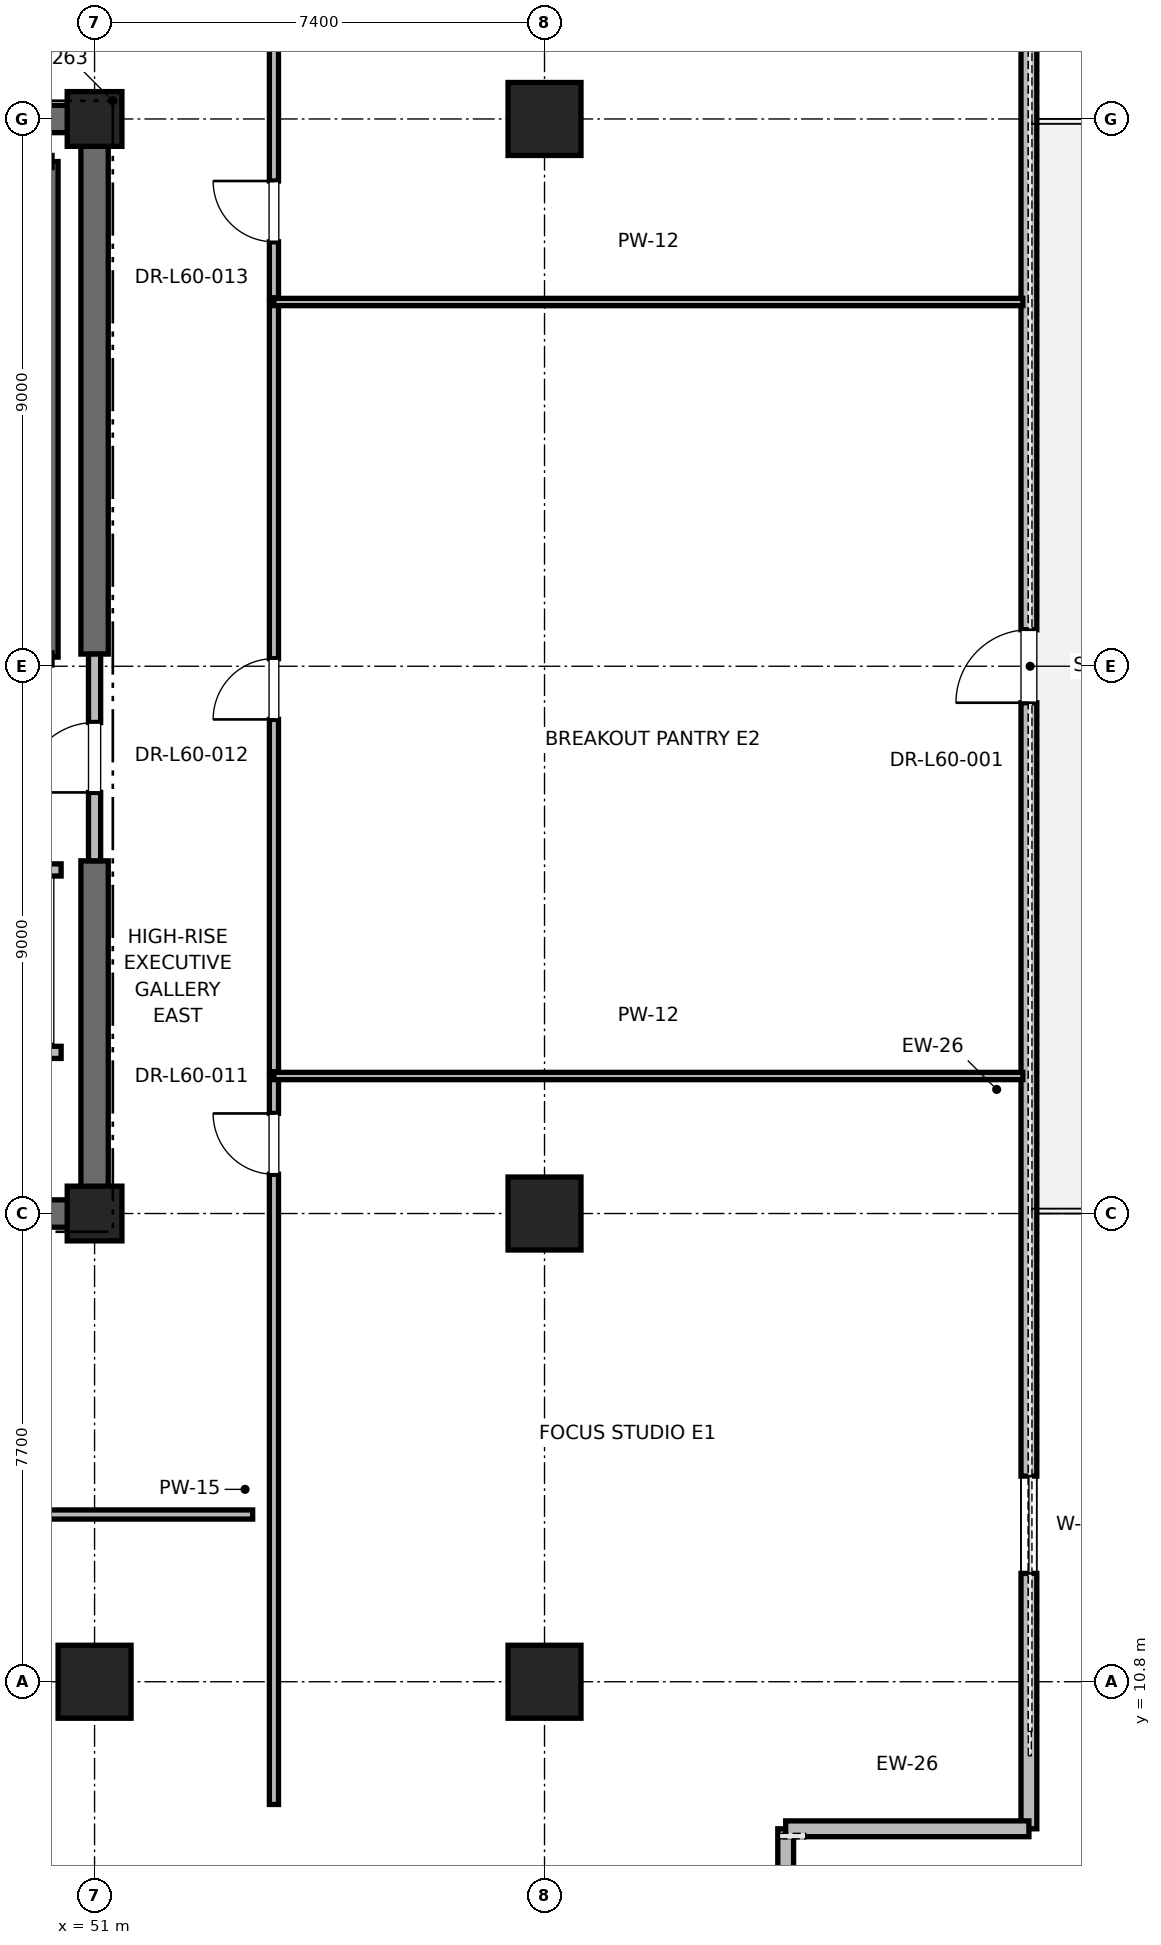
"""IFC4 building model, lengths in metres.
Left out: names, types, materials, properties, quantities, classifications, styles, units other than length and angle.
Written with IfcOpenShell. Run it as: python <this file> out.ifc"""

import sys

from ifc_helpers import new_model, si_unit, direction, frame, frame_2d, origin, origin_2d, place, context, subcontext, project, spatial, rectangle, extrude, element, fill, save


model = new_model("IFC4")
c1 = context("Model", 3, precision=1e-05, world=origin(), true_north=direction((0.0, 1.0)))
c2 = subcontext(c1, "Body", "Model", "MODEL_VIEW")
j1 = project(units=[si_unit("LENGTHUNIT", "METRE"), si_unit("PLANEANGLEUNIT", "RADIAN")], contexts=[c1])
p1 = place(None, origin())
s1 = spatial("IfcSite", under=j1, at=p1, CompositionType="ELEMENT")
p2 = place(p1, origin())
s2 = spatial("IfcBuilding", under=s1, at=p2, CompositionType="ELEMENT")
p3 = place(p2, frame((0.0, 0.0, 259.2)))
s3 = spatial("IfcBuildingStorey", under=s2, at=p3, CompositionType="ELEMENT", Elevation=259.2)
for number, where, z_axis, x_axis in (
    (1, (51.0, 10.8, 0.0), (0.0, 0.0, 1.0), (1.0, 0.0, 0.0)),
    (2, (58.4, 18.5, 0.0), (0.0, 0.0, 1.0), (1.0, 0.0, 0.0)),
    (3, (58.4, 36.5, 0.0), (0.0, 0.0, 1.0), (1.0, 0.0, 0.0)),
    (4, (58.4, 10.8, 0.0), (0.0, 0.0, 1.0), (1.0, 0.0, 0.0)),
):
    element("IfcColumn", number, at=place(p3, frame(where, z_axis=z_axis, x_axis=x_axis)), inside=s3, PredefinedType="COLUMN", context=c2, shape_type="SweptSolid", body=[
        extrude(rectangle(XDim=1.2, YDim=1.2, at=origin_2d()), origin(), (0.0, 0.0, 1.0), 4.0),
    ])
for number, where, z_axis, x_axis in (
    (5, (51.0, 18.5, 0.0), (0.0, 0.0, 1.0), (1.0, 0.0, 0.0)),
    (6, (51.0, 36.5, 0.0), (0.0, 0.0, 1.0), (1.0, 0.0, 0.0)),
):
    element("IfcColumn", number, at=place(p3, frame(where, z_axis=z_axis, x_axis=x_axis)), inside=s3, PredefinedType="PILASTER", context=c2, shape_type="SweptSolid", body=[
        extrude(rectangle(XDim=0.9, YDim=0.9, at=origin_2d()), origin(), (0.0, 0.0, 1.0), 4.0),
    ])
p4 = place(p3, frame((41.8, 18.5, 0.0), z_axis=(0.0, 0.0, 1.0), x_axis=(1.0, 0.0, 0.0)))
e7 = element("IfcWall", 7, at=p4, inside=s3, PredefinedType="SHEAR", context=c2, shape_type="SweptSolid", body=[
    extrude(rectangle(XDim=9.2, YDim=0.45, at=frame_2d((4.6, 0.0))), origin(), (0.0, 0.0, 1.0), 3.785),
])
for number, where, z_axis, x_axis in (
    (8, (45.2, 36.5, 0.0), (0.0, 0.0, 1.0), (1.0, 0.0, 0.0)),
    (9, (51.0, 18.5, 0.0), (0.0, 0.0, 1.0), (0.0, 1.0, 0.0)),
):
    element("IfcWall", number, at=place(p3, frame(where, z_axis=z_axis, x_axis=x_axis)), inside=s3, PredefinedType="SHEAR", context=c2, shape_type="SweptSolid", body=[
        extrude(rectangle(XDim=5.8, YDim=0.45, at=frame_2d((2.9, 0.0))), origin(), (0.0, 0.0, 1.0), 3.785),
    ])
p5 = place(p3, frame((51.0, 27.7, 0.0), z_axis=(0.0, 0.0, 1.0), x_axis=(0.0, 1.0, 0.0)))
e10 = element("IfcWall", 10, at=p5, inside=s3, PredefinedType="SHEAR", context=c2, shape_type="SweptSolid", body=[
    extrude(rectangle(XDim=8.8, YDim=0.45, at=frame_2d((4.4, 0.0))), origin(), (0.0, 0.0, 1.0), 3.785),
])
p6 = place(p3, frame((66.366, 8.382, 0.0), z_axis=(0.0, 0.0, 1.0), x_axis=(0.0, 1.0, 0.0)))
e11 = element("IfcWall", 11, at=p6, inside=s3, PredefinedType="PARAPET", context=c2, shape_type="SweptSolid", body=[
    extrude(rectangle(XDim=38.236, YDim=0.26, at=frame_2d((19.118, 0.0))), origin(), (0.0, 0.0, 1.0), 3.123),
])
p7 = place(p6, frame((4.2, 0.0, 0.85)))
e12 = element("IfcOpeningElement", 12, at=p7, cuts=e11, PredefinedType="OPENING", context=c2, shape_type="SweptSolid", body=[
    extrude(rectangle(XDim=1.6, YDim=2.1, at=frame_2d((0.8, 1.05))), frame((0.0, 0.13, 0.0), z_axis=(0.0, -1.0, 0.0), x_axis=(1.0, 0.0, 0.0)), (0.0, 0.0, 1.0), 0.26),
])
p8 = place(p6, frame((18.518, 0.0, 0.0)))
e13 = element("IfcOpeningElement", 13, at=p8, cuts=e11, PredefinedType="OPENING", context=c2, shape_type="SweptSolid", body=[
    extrude(rectangle(XDim=1.2, YDim=2.2, at=frame_2d((0.6, 1.1))), frame((0.0, 0.13, 0.0), z_axis=(0.0, -1.0, 0.0), x_axis=(1.0, 0.0, 0.0)), (0.0, 0.0, 1.0), 0.26),
])
p9 = place(p6, frame((32.436, 0.0, 0.85)))
e14 = element("IfcOpeningElement", 14, at=p9, cuts=e11, PredefinedType="OPENING", context=c2, shape_type="SweptSolid", body=[
    extrude(rectangle(XDim=1.6, YDim=2.1, at=frame_2d((0.8, 1.05))), frame((0.0, 0.13, 0.0), z_axis=(0.0, -1.0, 0.0), x_axis=(1.0, 0.0, 0.0)), (0.0, 0.0, 1.0), 0.26),
])
p10 = place(p3, frame((62.366, 4.882, 0.0), z_axis=(0.0, 0.0, 1.0), x_axis=(0.0, 1.0, 0.0)))
e15 = element("IfcWall", 15, at=p10, inside=s3, PredefinedType="PARAPET", context=c2, shape_type="SweptSolid", body=[
    extrude(rectangle(XDim=3.5, YDim=0.26, at=frame_2d((1.75, 0.0))), origin(), (0.0, 0.0, 1.0), 3.785),
])
p11 = place(p10, frame((0.85, 0.0, 0.85)))
e16 = element("IfcOpeningElement", 16, at=p11, cuts=e15, PredefinedType="OPENING", context=c2, shape_type="SweptSolid", body=[
    extrude(rectangle(XDim=1.8, YDim=2.2, at=frame_2d((0.9, 1.1))), frame((0.0, 0.13, 0.0), z_axis=(0.0, -1.0, 0.0), x_axis=(1.0, 0.0, 0.0)), (0.0, 0.0, 1.0), 0.26),
])
p12 = place(p3, frame((62.366, 8.382, 0.0), z_axis=(0.0, 0.0, 1.0), x_axis=(1.0, 0.0, 0.0)))
e17 = element("IfcWall", 17, at=p12, inside=s3, PredefinedType="PARAPET", context=c2, shape_type="SweptSolid", body=[
    extrude(rectangle(XDim=4.0, YDim=0.26, at=frame_2d((2.0, 0.0))), origin(), (0.0, 0.0, 1.0), 3.785),
])
p13 = place(p3, frame((50.3, 27.65, 0.0), z_axis=(0.0, 0.0, 1.0), x_axis=(0.0, 1.0, 0.0)))
e18 = element("IfcWall", 18, at=p13, inside=s3, PredefinedType="SOLIDWALL", context=c2, shape_type="SweptSolid", body=[
    extrude(rectangle(XDim=8.15, YDim=0.2, at=frame_2d((4.075, 0.0))), origin(), (0.0, 0.0, 1.0), 3.785),
])
p14 = place(p3, frame((51.0, 24.3, 0.0), z_axis=(0.0, 0.0, 1.0), x_axis=(0.0, 1.0, 0.0)))
e19 = element("IfcWall", 19, at=p14, inside=s3, PredefinedType="PARTITIONING", context=c2, shape_type="SweptSolid", body=[
    extrude(rectangle(XDim=3.4, YDim=0.2, at=frame_2d((1.7, 0.0))), origin(), (0.0, 0.0, 1.0), 2.865),
])
p15 = place(p14, frame((1.125, 0.0, 0.0)))
e20 = element("IfcOpeningElement", 20, at=p15, cuts=e19, PredefinedType="OPENING", context=c2, shape_type="SweptSolid", body=[
    extrude(rectangle(XDim=1.15, YDim=2.2, at=frame_2d((0.575, 1.1))), frame((0.0, 0.1, 0.0), z_axis=(0.0, -1.0, 0.0), x_axis=(1.0, 0.0, 0.0)), (0.0, 0.0, 1.0), 0.2),
])
p16 = place(p3, frame((47.85, 21.15, 0.0), z_axis=(0.0, 0.0, 1.0), x_axis=(1.0, 0.0, 0.0)))
e21 = element("IfcWall", 21, at=p16, inside=s3, PredefinedType="SOLIDWALL", context=c2, shape_type="SweptSolid", body=[
    extrude(rectangle(XDim=2.6, YDim=0.2, at=frame_2d((1.3, 0.0))), origin(), (0.0, 0.0, 1.0), 3.785),
])
p17 = place(p3, frame((50.45, 24.15, 0.0), z_axis=(0.0, 0.0, 1.0), x_axis=(-1.0, 0.0, 0.0)))
e22 = element("IfcWall", 22, at=p17, inside=s3, PredefinedType="SOLIDWALL", context=c2, shape_type="SweptSolid", body=[
    extrude(rectangle(XDim=2.6, YDim=0.2, at=frame_2d((1.3, 0.0))), origin(), (0.0, 0.0, 1.0), 2.865),
])
p18 = place(p17, frame((0.75, 0.0, 0.0)))
e23 = element("IfcOpeningElement", 23, at=p18, cuts=e22, PredefinedType="OPENING", context=c2, shape_type="SweptSolid", body=[
    extrude(rectangle(XDim=1.1, YDim=2.2, at=frame_2d((0.55, 1.1))), frame((0.0, 0.1, 0.0), z_axis=(0.0, -1.0, 0.0), x_axis=(1.0, 0.0, 0.0)), (0.0, 0.0, 1.0), 0.2),
])
p19 = place(p3, frame((26.4, 13.55, 0.0), z_axis=(0.0, 0.0, 1.0), x_axis=(1.0, 0.0, 0.0)))
e24 = element("IfcWall", 24, at=p19, inside=s3, PredefinedType="PARTITIONING", context=c2, shape_type="SweptSolid", body=[
    extrude(rectangle(XDim=27.2, YDim=0.15, at=frame_2d((13.6, 0.0))), origin(), (0.0, 0.0, 1.0), 2.85),
])
p20 = place(p19, frame((13.075, 0.0, 0.0)))
e25 = element("IfcOpeningElement", 25, at=p20, cuts=e24, PredefinedType="OPENING", context=c2, shape_type="SweptSolid", body=[
    extrude(rectangle(XDim=1.05, YDim=2.2, at=frame_2d((0.525, 1.1))), frame((0.0, 0.075, 0.0), z_axis=(0.0, -1.0, 0.0), x_axis=(1.0, 0.0, 0.0)), (0.0, 0.0, 1.0), 0.15),
])
p21 = place(p3, frame((53.95, 8.782, 0.0), z_axis=(0.0, 0.0, 1.0), x_axis=(0.0, 1.0, 0.0)))
e26 = element("IfcWall", 26, at=p21, inside=s3, PredefinedType="PARTITIONING", context=c2, shape_type="SweptSolid", body=[
    extrude(rectangle(XDim=11.98, YDim=0.15, at=frame_2d((5.99, 0.0))), origin(), (0.0, 0.0, 1.0), 2.85),
])
p22 = place(p21, frame((10.364, 0.0, 0.0)))
e27 = element("IfcOpeningElement", 27, at=p22, cuts=e26, PredefinedType="OPENING", context=c2, shape_type="SweptSolid", body=[
    extrude(rectangle(XDim=1.0, YDim=2.15, at=frame_2d((0.5, 1.075))), frame((0.0, 0.075, 0.0), z_axis=(0.0, -1.0, 0.0), x_axis=(1.0, 0.0, 0.0)), (0.0, 0.0, 1.0), 0.15),
])
p23 = place(p3, frame((53.95, 20.761, 0.0), z_axis=(0.0, 0.0, 1.0), x_axis=(1.0, 0.0, 0.0)))
e28 = element("IfcWall", 28, at=p23, inside=s3, PredefinedType="PARTITIONING", context=c2, shape_type="SweptSolid", body=[
    extrude(rectangle(XDim=12.317, YDim=0.12, at=frame_2d((6.158, 0.0))), origin(), (0.0, 0.0, 1.0), 2.85),
])
p24 = place(p3, frame((53.95, 20.831, 0.0), z_axis=(0.0, 0.0, 1.0), x_axis=(0.0, 1.0, 0.0)))
e29 = element("IfcWall", 29, at=p24, inside=s3, PredefinedType="PARTITIONING", context=c2, shape_type="SweptSolid", body=[
    extrude(rectangle(XDim=12.658, YDim=0.15, at=frame_2d((6.329, 0.0))), origin(), (0.0, 0.0, 1.0), 2.85),
])
p25 = place(p24, frame((5.794, 0.0, 0.0)))
e30 = element("IfcOpeningElement", 30, at=p25, cuts=e29, PredefinedType="OPENING", context=c2, shape_type="SweptSolid", body=[
    extrude(rectangle(XDim=1.0, YDim=2.15, at=frame_2d((0.5, 1.075))), frame((0.0, 0.075, 0.0), z_axis=(0.0, -1.0, 0.0), x_axis=(1.0, 0.0, 0.0)), (0.0, 0.0, 1.0), 0.15),
])
p26 = place(p3, frame((53.95, 33.49, 0.0), z_axis=(0.0, 0.0, 1.0), x_axis=(1.0, 0.0, 0.0)))
e31 = element("IfcWall", 31, at=p26, inside=s3, PredefinedType="PARTITIONING", context=c2, shape_type="SweptSolid", body=[
    extrude(rectangle(XDim=12.317, YDim=0.12, at=frame_2d((6.158, 0.0))), origin(), (0.0, 0.0, 1.0), 2.85),
])
p27 = place(p3, frame((53.95, 33.56, 0.0), z_axis=(0.0, 0.0, 1.0), x_axis=(0.0, 1.0, 0.0)))
e32 = element("IfcWall", 32, at=p27, inside=s3, PredefinedType="PARTITIONING", context=c2, shape_type="SweptSolid", body=[
    extrude(rectangle(XDim=12.658, YDim=0.15, at=frame_2d((6.329, 0.0))), origin(), (0.0, 0.0, 1.0), 2.85),
])
p28 = place(p27, frame((0.92, 0.0, 0.0)))
e33 = element("IfcOpeningElement", 33, at=p28, cuts=e32, PredefinedType="OPENING", context=c2, shape_type="SweptSolid", body=[
    extrude(rectangle(XDim=1.0, YDim=2.15, at=frame_2d((0.5, 1.075))), frame((0.0, 0.075, 0.0), z_axis=(0.0, -1.0, 0.0), x_axis=(1.0, 0.0, 0.0)), (0.0, 0.0, 1.0), 0.15),
])
p29 = place(p7, origin())
e34 = element("IfcWindow", 34, at=p29, inside=s3, PartitioningType="SINGLE_PANEL", PredefinedType="WINDOW", context=c2, shape_type="SweptSolid", body=[
    extrude(rectangle(XDim=1.6, YDim=2.1, at=frame_2d((0.8, 1.05))), frame((0.0, 0.03, 0.0), z_axis=(0.0, -1.0, 0.0), x_axis=(1.0, 0.0, 0.0)), (0.0, 0.0, 1.0), 0.06),
])
fill(e12, e34)
p30 = place(p8, origin())
e35 = element("IfcDoor", 35, at=p30, inside=s3, OperationType="SINGLE_SWING_LEFT", PredefinedType="DOOR", context=c2, shape_type="SweptSolid", body=[
    extrude(rectangle(XDim=1.2, YDim=2.2, at=frame_2d((0.6, 1.1))), frame((0.0, 0.025, 0.0), z_axis=(0.0, -1.0, 0.0), x_axis=(1.0, 0.0, 0.0)), (0.0, 0.0, 1.0), 0.05),
])
fill(e13, e35)
p31 = place(p15, origin())
e36 = element("IfcDoor", 36, at=p31, inside=s3, OperationType="SINGLE_SWING_LEFT", PredefinedType="DOOR", context=c2, shape_type="SweptSolid", body=[
    extrude(rectangle(XDim=1.15, YDim=2.2, at=frame_2d((0.575, 1.1))), frame((0.0, 0.025, 0.0), z_axis=(0.0, -1.0, 0.0), x_axis=(1.0, 0.0, 0.0)), (0.0, 0.0, 1.0), 0.05),
])
fill(e20, e36)
p32 = place(p22, origin())
e37 = element("IfcDoor", 37, at=p32, inside=s3, OperationType="SINGLE_SWING_RIGHT", PredefinedType="DOOR", context=c2, shape_type="SweptSolid", body=[
    extrude(rectangle(XDim=1.0, YDim=2.15, at=frame_2d((0.5, 1.075))), frame((0.0, 0.025, 0.0), z_axis=(0.0, -1.0, 0.0), x_axis=(1.0, 0.0, 0.0)), (0.0, 0.0, 1.0), 0.05),
])
fill(e27, e37)
p33 = place(p25, origin())
e38 = element("IfcDoor", 38, at=p33, inside=s3, OperationType="SINGLE_SWING_LEFT", PredefinedType="DOOR", context=c2, shape_type="SweptSolid", body=[
    extrude(rectangle(XDim=1.0, YDim=2.15, at=frame_2d((0.5, 1.075))), frame((0.0, 0.025, 0.0), z_axis=(0.0, -1.0, 0.0), x_axis=(1.0, 0.0, 0.0)), (0.0, 0.0, 1.0), 0.05),
])
fill(e30, e38)
p34 = place(p28, origin())
e39 = element("IfcDoor", 39, at=p34, inside=s3, OperationType="SINGLE_SWING_RIGHT", PredefinedType="DOOR", context=c2, shape_type="SweptSolid", body=[
    extrude(rectangle(XDim=1.0, YDim=2.15, at=frame_2d((0.5, 1.075))), frame((0.0, 0.025, 0.0), z_axis=(0.0, -1.0, 0.0), x_axis=(1.0, 0.0, 0.0)), (0.0, 0.0, 1.0), 0.05),
])
fill(e33, e39)
save(model, sys.argv[1])
